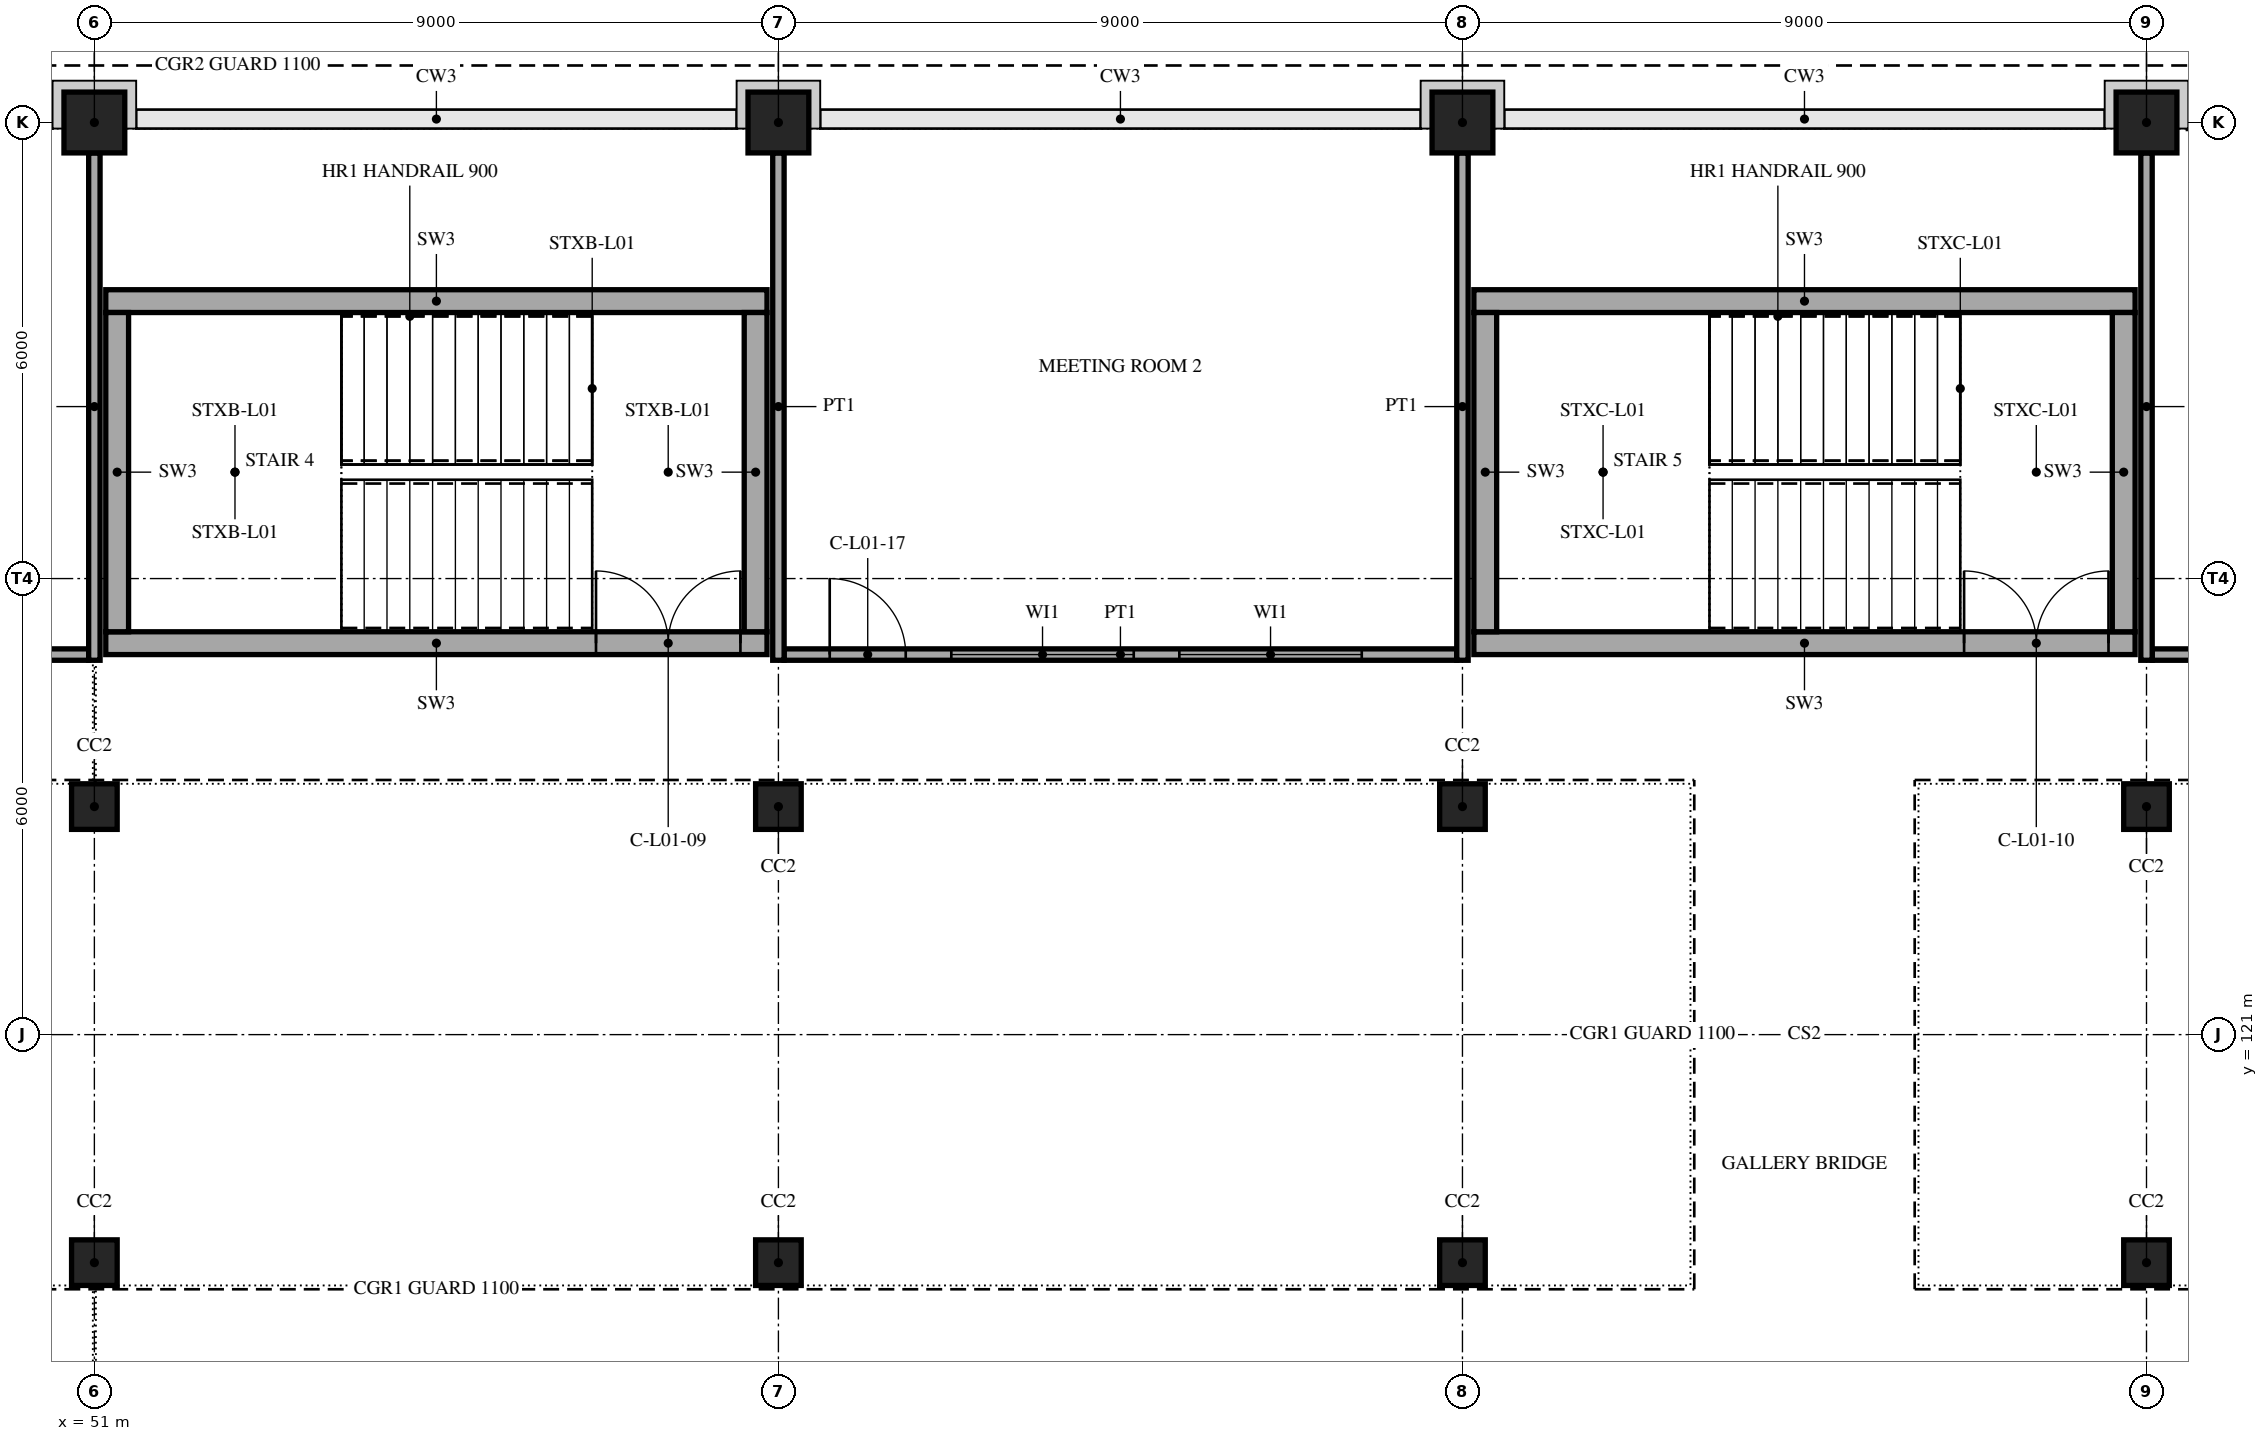
"""IFC4 building model, lengths in metres.
Left out: names, types, materials, properties, quantities, classifications, styles, units other than length and angle.
Written with IfcOpenShell. Run it as: python <this file> out.ifc"""

import sys

from ifc_helpers import new_model, si_unit, direction, frame, frame_2d, origin, origin_2d, place, context, subcontext, project, spatial, rectangle, extrude, element, fill, save


model = new_model("IFC4")
c1 = context("Model", 3, precision=1e-05, world=origin(), true_north=direction((0.0, 1.0)))
c2 = subcontext(c1, "Body", "Model", "MODEL_VIEW")
j1 = project(units=[si_unit("LENGTHUNIT", "METRE"), si_unit("PLANEANGLEUNIT", "RADIAN")], contexts=[c1])
p1 = place(None, origin())
s1 = spatial("IfcSite", under=j1, at=p1, CompositionType="ELEMENT")
p2 = place(p1, origin())
s2 = spatial("IfcBuilding", under=s1, at=p2, CompositionType="ELEMENT")
p3 = place(p2, frame((0.0, 0.0, 5.0)))
s3 = spatial("IfcBuildingStorey", under=s2, at=p3, CompositionType="ELEMENT", Elevation=5.0)
for number, where, z_axis, x_axis in (
    (1, (51.0, 118.0, 0.0), (0.0, 0.0, 1.0), (1.0, 0.0, 0.0)),
    (2, (51.0, 124.0, 0.0), (0.0, 0.0, 1.0), (1.0, 0.0, 0.0)),
):
    element("IfcColumn", number, at=place(p3, frame(where, z_axis=z_axis, x_axis=x_axis)), inside=s3, PredefinedType="COLUMN", context=c2, shape_type="SweptSolid", body=[
        extrude(rectangle(XDim=0.6, YDim=0.6, at=origin_2d()), origin(), (0.0, 0.0, 1.0), 5.0),
    ])
p4 = place(p3, frame((51.0, 133.0, 0.0), z_axis=(0.0, 0.0, 1.0), x_axis=(1.0, 0.0, 0.0)))
e3 = element("IfcColumn", 3, at=p4, inside=s3, PredefinedType="COLUMN", context=c2, shape_type="SweptSolid", body=[
    extrude(rectangle(XDim=0.8, YDim=0.8, at=origin_2d()), origin(), (0.0, 0.0, 1.0), 5.0),
])
for number, where, z_axis, x_axis in (
    (4, (60.0, 118.0, 0.0), (0.0, 0.0, 1.0), (1.0, 0.0, 0.0)),
    (5, (60.0, 124.0, 0.0), (0.0, 0.0, 1.0), (1.0, 0.0, 0.0)),
):
    element("IfcColumn", number, at=place(p3, frame(where, z_axis=z_axis, x_axis=x_axis)), inside=s3, PredefinedType="COLUMN", context=c2, shape_type="SweptSolid", body=[
        extrude(rectangle(XDim=0.6, YDim=0.6, at=origin_2d()), origin(), (0.0, 0.0, 1.0), 5.0),
    ])
p5 = place(p3, frame((60.0, 133.0, 0.0), z_axis=(0.0, 0.0, 1.0), x_axis=(1.0, 0.0, 0.0)))
e6 = element("IfcColumn", 6, at=p5, inside=s3, PredefinedType="COLUMN", context=c2, shape_type="SweptSolid", body=[
    extrude(rectangle(XDim=0.8, YDim=0.8, at=origin_2d()), origin(), (0.0, 0.0, 1.0), 5.0),
])
for number, where, z_axis, x_axis in (
    (7, (69.0, 118.0, 0.0), (0.0, 0.0, 1.0), (1.0, 0.0, 0.0)),
    (8, (69.0, 124.0, 0.0), (0.0, 0.0, 1.0), (1.0, 0.0, 0.0)),
):
    element("IfcColumn", number, at=place(p3, frame(where, z_axis=z_axis, x_axis=x_axis)), inside=s3, PredefinedType="COLUMN", context=c2, shape_type="SweptSolid", body=[
        extrude(rectangle(XDim=0.6, YDim=0.6, at=origin_2d()), origin(), (0.0, 0.0, 1.0), 5.0),
    ])
p6 = place(p3, frame((69.0, 133.0, 0.0), z_axis=(0.0, 0.0, 1.0), x_axis=(1.0, 0.0, 0.0)))
e9 = element("IfcColumn", 9, at=p6, inside=s3, PredefinedType="COLUMN", context=c2, shape_type="SweptSolid", body=[
    extrude(rectangle(XDim=0.8, YDim=0.8, at=origin_2d()), origin(), (0.0, 0.0, 1.0), 5.0),
])
for number, where, z_axis, x_axis in (
    (10, (78.0, 118.0, 0.0), (0.0, 0.0, 1.0), (1.0, 0.0, 0.0)),
    (11, (78.0, 124.0, 0.0), (0.0, 0.0, 1.0), (1.0, 0.0, 0.0)),
):
    element("IfcColumn", number, at=place(p3, frame(where, z_axis=z_axis, x_axis=x_axis)), inside=s3, PredefinedType="COLUMN", context=c2, shape_type="SweptSolid", body=[
        extrude(rectangle(XDim=0.6, YDim=0.6, at=origin_2d()), origin(), (0.0, 0.0, 1.0), 5.0),
    ])
p7 = place(p3, frame((78.0, 133.0, 0.0), z_axis=(0.0, 0.0, 1.0), x_axis=(1.0, 0.0, 0.0)))
e12 = element("IfcColumn", 12, at=p7, inside=s3, PredefinedType="COLUMN", context=c2, shape_type="SweptSolid", body=[
    extrude(rectangle(XDim=0.8, YDim=0.8, at=origin_2d()), origin(), (0.0, 0.0, 1.0), 5.0),
])
p8 = place(p3, frame((51.15, 126.15, 0.0), z_axis=(0.0, 0.0, 1.0), x_axis=(1.0, 0.0, 0.0)))
e13 = element("IfcWall", 13, at=p8, inside=s3, PredefinedType="SHEAR", context=c2, shape_type="SweptSolid", body=[
    extrude(rectangle(XDim=8.7, YDim=0.3, at=frame_2d((4.35, 0.0))), origin(), (0.0, 0.0, 1.0), 5.0),
])
p9 = place(p8, frame((6.45, 0.0, 0.0)))
e14 = element("IfcOpeningElement", 14, at=p9, cuts=e13, PredefinedType="OPENING", context=c2, shape_type="SweptSolid", body=[
    extrude(rectangle(XDim=1.9, YDim=2.1, at=frame_2d((0.95, 1.05))), frame((0.0, 0.16, 0.0), z_axis=(0.0, -1.0, 0.0), x_axis=(1.0, 0.0, 0.0)), (0.0, 0.0, 1.0), 0.32),
])
p10 = place(p3, frame((51.15, 130.65, 0.0), z_axis=(0.0, 0.0, 1.0), x_axis=(1.0, 0.0, 0.0)))
e15 = element("IfcWall", 15, at=p10, inside=s3, PredefinedType="SHEAR", context=c2, shape_type="SweptSolid", body=[
    extrude(rectangle(XDim=8.7, YDim=0.3, at=frame_2d((4.35, 0.0))), origin(), (0.0, 0.0, 1.0), 5.0),
])
for number, where, z_axis, x_axis in (
    (16, (51.3, 126.3, 0.0), (0.0, 0.0, 1.0), (0.0, 1.0, 0.0)),
    (17, (59.7, 126.3, 0.0), (0.0, 0.0, 1.0), (0.0, 1.0, 0.0)),
):
    element("IfcWall", number, at=place(p3, frame(where, z_axis=z_axis, x_axis=x_axis)), inside=s3, PredefinedType="SHEAR", context=c2, shape_type="SweptSolid", body=[
        extrude(rectangle(XDim=4.2, YDim=0.3, at=frame_2d((2.1, 0.0))), origin(), (0.0, 0.0, 1.0), 5.0),
    ])
p11 = place(p3, frame((69.15, 126.15, 0.0), z_axis=(0.0, 0.0, 1.0), x_axis=(1.0, 0.0, 0.0)))
e18 = element("IfcWall", 18, at=p11, inside=s3, PredefinedType="SHEAR", context=c2, shape_type="SweptSolid", body=[
    extrude(rectangle(XDim=8.7, YDim=0.3, at=frame_2d((4.35, 0.0))), origin(), (0.0, 0.0, 1.0), 5.0),
])
p12 = place(p11, frame((6.45, 0.0, 0.0)))
e19 = element("IfcOpeningElement", 19, at=p12, cuts=e18, PredefinedType="OPENING", context=c2, shape_type="SweptSolid", body=[
    extrude(rectangle(XDim=1.9, YDim=2.1, at=frame_2d((0.95, 1.05))), frame((0.0, 0.16, 0.0), z_axis=(0.0, -1.0, 0.0), x_axis=(1.0, 0.0, 0.0)), (0.0, 0.0, 1.0), 0.32),
])
p13 = place(p3, frame((69.15, 130.65, 0.0), z_axis=(0.0, 0.0, 1.0), x_axis=(1.0, 0.0, 0.0)))
e20 = element("IfcWall", 20, at=p13, inside=s3, PredefinedType="SHEAR", context=c2, shape_type="SweptSolid", body=[
    extrude(rectangle(XDim=8.7, YDim=0.3, at=frame_2d((4.35, 0.0))), origin(), (0.0, 0.0, 1.0), 5.0),
])
for number, where, z_axis, x_axis in (
    (21, (69.3, 126.3, 0.0), (0.0, 0.0, 1.0), (0.0, 1.0, 0.0)),
    (22, (77.7, 126.3, 0.0), (0.0, 0.0, 1.0), (0.0, 1.0, 0.0)),
):
    element("IfcWall", number, at=place(p3, frame(where, z_axis=z_axis, x_axis=x_axis)), inside=s3, PredefinedType="SHEAR", context=c2, shape_type="SweptSolid", body=[
        extrude(rectangle(XDim=4.2, YDim=0.3, at=frame_2d((2.1, 0.0))), origin(), (0.0, 0.0, 1.0), 5.0),
    ])
p14 = place(p3, frame((42.075, 126.0, 0.0), z_axis=(0.0, 0.0, 1.0), x_axis=(1.0, 0.0, 0.0)))
e23 = element("IfcWall", 23, at=p14, inside=s3, PredefinedType="PARTITIONING", context=c2, shape_type="SweptSolid", body=[
    extrude(rectangle(XDim=8.85, YDim=0.15, at=frame_2d((4.425, 0.0))), origin(), (0.0, 0.0, 1.0), 4.8),
])
p15 = place(p14, frame((0.6, 0.0, 0.0)))
e24 = element("IfcOpeningElement", 24, at=p15, cuts=e23, PredefinedType="OPENING", context=c2, shape_type="SweptSolid", body=[
    extrude(rectangle(XDim=1.0, YDim=2.1, at=frame_2d((0.5, 1.05))), frame((0.0, 0.085, 0.0), z_axis=(0.0, -1.0, 0.0), x_axis=(1.0, 0.0, 0.0)), (0.0, 0.0, 1.0), 0.17),
])
p16 = place(p14, frame((2.2, 0.0, 0.9)))
e25 = element("IfcOpeningElement", 25, at=p16, cuts=e23, PredefinedType="OPENING", context=c2, shape_type="SweptSolid", body=[
    extrude(rectangle(XDim=2.4, YDim=1.5, at=frame_2d((1.2, 0.75))), frame((0.0, 0.085, 0.0), z_axis=(0.0, -1.0, 0.0), x_axis=(1.0, 0.0, 0.0)), (0.0, 0.0, 1.0), 0.17),
])
p17 = place(p14, frame((5.2, 0.0, 0.9)))
e26 = element("IfcOpeningElement", 26, at=p17, cuts=e23, PredefinedType="OPENING", context=c2, shape_type="SweptSolid", body=[
    extrude(rectangle(XDim=2.4, YDim=1.5, at=frame_2d((1.2, 0.75))), frame((0.0, 0.085, 0.0), z_axis=(0.0, -1.0, 0.0), x_axis=(1.0, 0.0, 0.0)), (0.0, 0.0, 1.0), 0.17),
])
p18 = place(p3, frame((51.0, 125.925, 0.0), z_axis=(0.0, 0.0, 1.0), x_axis=(0.0, 1.0, 0.0)))
e27 = element("IfcWall", 27, at=p18, inside=s3, PredefinedType="PARTITIONING", context=c2, shape_type="SweptSolid", body=[
    extrude(rectangle(XDim=6.675, YDim=0.15, at=frame_2d((3.337, 0.0))), origin(), (0.0, 0.0, 1.0), 4.0),
])
p19 = place(p3, frame((60.075, 126.0, 0.0), z_axis=(0.0, 0.0, 1.0), x_axis=(1.0, 0.0, 0.0)))
e28 = element("IfcWall", 28, at=p19, inside=s3, PredefinedType="PARTITIONING", context=c2, shape_type="SweptSolid", body=[
    extrude(rectangle(XDim=8.85, YDim=0.15, at=frame_2d((4.425, 0.0))), origin(), (0.0, 0.0, 1.0), 4.8),
])
p20 = place(p19, frame((0.6, 0.0, 0.0)))
e29 = element("IfcOpeningElement", 29, at=p20, cuts=e28, PredefinedType="OPENING", context=c2, shape_type="SweptSolid", body=[
    extrude(rectangle(XDim=1.0, YDim=2.1, at=frame_2d((0.5, 1.05))), frame((0.0, 0.085, 0.0), z_axis=(0.0, -1.0, 0.0), x_axis=(1.0, 0.0, 0.0)), (0.0, 0.0, 1.0), 0.17),
])
p21 = place(p19, frame((2.2, 0.0, 0.9)))
e30 = element("IfcOpeningElement", 30, at=p21, cuts=e28, PredefinedType="OPENING", context=c2, shape_type="SweptSolid", body=[
    extrude(rectangle(XDim=2.4, YDim=1.5, at=frame_2d((1.2, 0.75))), frame((0.0, 0.085, 0.0), z_axis=(0.0, -1.0, 0.0), x_axis=(1.0, 0.0, 0.0)), (0.0, 0.0, 1.0), 0.17),
])
p22 = place(p19, frame((5.2, 0.0, 0.9)))
e31 = element("IfcOpeningElement", 31, at=p22, cuts=e28, PredefinedType="OPENING", context=c2, shape_type="SweptSolid", body=[
    extrude(rectangle(XDim=2.4, YDim=1.5, at=frame_2d((1.2, 0.75))), frame((0.0, 0.085, 0.0), z_axis=(0.0, -1.0, 0.0), x_axis=(1.0, 0.0, 0.0)), (0.0, 0.0, 1.0), 0.17),
])
for number, where, z_axis, x_axis in (
    (32, (60.0, 125.925, 0.0), (0.0, 0.0, 1.0), (0.0, 1.0, 0.0)),
    (33, (69.0, 125.925, 0.0), (0.0, 0.0, 1.0), (0.0, 1.0, 0.0)),
):
    element("IfcWall", number, at=place(p3, frame(where, z_axis=z_axis, x_axis=x_axis)), inside=s3, PredefinedType="PARTITIONING", context=c2, shape_type="SweptSolid", body=[
        extrude(rectangle(XDim=6.675, YDim=0.15, at=frame_2d((3.337, 0.0))), origin(), (0.0, 0.0, 1.0), 4.0),
    ])
p23 = place(p3, frame((78.075, 126.0, 0.0), z_axis=(0.0, 0.0, 1.0), x_axis=(1.0, 0.0, 0.0)))
e34 = element("IfcWall", 34, at=p23, inside=s3, PredefinedType="PARTITIONING", context=c2, shape_type="SweptSolid", body=[
    extrude(rectangle(XDim=8.85, YDim=0.15, at=frame_2d((4.425, 0.0))), origin(), (0.0, 0.0, 1.0), 4.8),
])
p24 = place(p23, frame((0.6, 0.0, 0.0)))
e35 = element("IfcOpeningElement", 35, at=p24, cuts=e34, PredefinedType="OPENING", context=c2, shape_type="SweptSolid", body=[
    extrude(rectangle(XDim=1.0, YDim=2.1, at=frame_2d((0.5, 1.05))), frame((0.0, 0.085, 0.0), z_axis=(0.0, -1.0, 0.0), x_axis=(1.0, 0.0, 0.0)), (0.0, 0.0, 1.0), 0.17),
])
p25 = place(p3, frame((78.0, 125.925, 0.0), z_axis=(0.0, 0.0, 1.0), x_axis=(0.0, 1.0, 0.0)))
e36 = element("IfcWall", 36, at=p25, inside=s3, PredefinedType="PARTITIONING", context=c2, shape_type="SweptSolid", body=[
    extrude(rectangle(XDim=6.675, YDim=0.15, at=frame_2d((3.337, 0.0))), origin(), (0.0, 0.0, 1.0), 4.0),
])
p26 = place(p9, origin())
e37 = element("IfcDoor", 37, at=p26, inside=s3, OperationType="DOUBLE_DOOR_SINGLE_SWING", PredefinedType="NOTDEFINED", context=c2, shape_type="SweptSolid", body=[
    extrude(rectangle(XDim=1.9, YDim=2.1, at=frame_2d((0.95, 1.05))), frame((0.0, 0.025, 0.0), z_axis=(0.0, -1.0, 0.0), x_axis=(1.0, 0.0, 0.0)), (0.0, 0.0, 1.0), 0.05),
])
fill(e14, e37)
p27 = place(p12, origin())
e38 = element("IfcDoor", 38, at=p27, inside=s3, OperationType="DOUBLE_DOOR_SINGLE_SWING", PredefinedType="NOTDEFINED", context=c2, shape_type="SweptSolid", body=[
    extrude(rectangle(XDim=1.9, YDim=2.1, at=frame_2d((0.95, 1.05))), frame((0.0, 0.025, 0.0), z_axis=(0.0, -1.0, 0.0), x_axis=(1.0, 0.0, 0.0)), (0.0, 0.0, 1.0), 0.05),
])
fill(e19, e38)
p28 = place(p20, origin())
e39 = element("IfcDoor", 39, at=p28, inside=s3, OperationType="SINGLE_SWING_LEFT", PredefinedType="NOTDEFINED", context=c2, shape_type="SweptSolid", body=[
    extrude(rectangle(XDim=1.0, YDim=2.1, at=frame_2d((0.5, 1.05))), frame((0.0, 0.025, 0.0), z_axis=(0.0, -1.0, 0.0), x_axis=(1.0, 0.0, 0.0)), (0.0, 0.0, 1.0), 0.05),
])
fill(e29, e39)
p29 = place(p21, origin())
e40 = element("IfcWindow", 40, at=p29, inside=s3, PartitioningType="SINGLE_PANEL", PredefinedType="WINDOW", context=c2, shape_type="SweptSolid", body=[
    extrude(rectangle(XDim=2.4, YDim=1.5, at=frame_2d((1.2, 0.75))), frame((0.0, 0.03, 0.0), z_axis=(0.0, -1.0, 0.0), x_axis=(1.0, 0.0, 0.0)), (0.0, 0.0, 1.0), 0.06),
])
fill(e30, e40)
p30 = place(p22, origin())
e41 = element("IfcWindow", 41, at=p30, inside=s3, PartitioningType="SINGLE_PANEL", PredefinedType="WINDOW", context=c2, shape_type="SweptSolid", body=[
    extrude(rectangle(XDim=2.4, YDim=1.5, at=frame_2d((1.2, 0.75))), frame((0.0, 0.03, 0.0), z_axis=(0.0, -1.0, 0.0), x_axis=(1.0, 0.0, 0.0)), (0.0, 0.0, 1.0), 0.06),
])
fill(e31, e41)
save(model, sys.argv[1])
